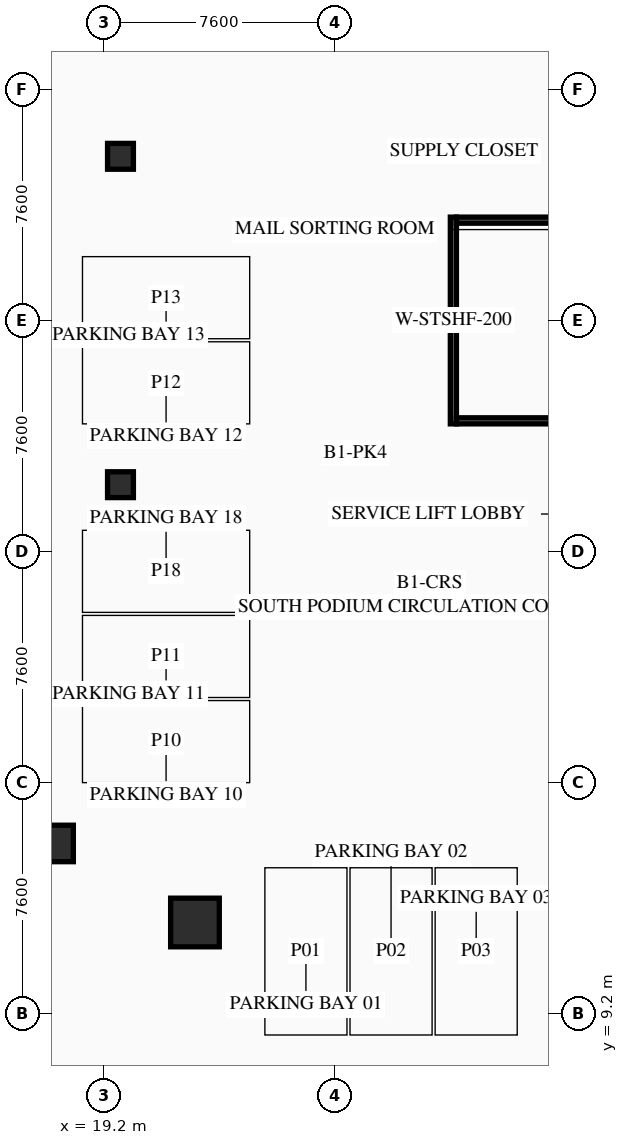
"""IFC4 building model, lengths in metres.
Left out: names, types, materials, properties, quantities, classifications, styles, units other than length and angle.
Written with IfcOpenShell. Run it as: python <this file> out.ifc"""

import sys

from ifc_helpers import new_model, si_unit, direction, frame, frame_2d, origin, origin_2d, place, context, subcontext, project, spatial, rectangle, hollow_rectangle, extrude, element, save


model = new_model("IFC4")
c1 = context("Model", 3, precision=1e-05, world=origin(), true_north=direction((0.0, 1.0)))
c2 = subcontext(c1, "Body", "Model", "MODEL_VIEW")
j1 = project(units=[si_unit("LENGTHUNIT", "METRE"), si_unit("PLANEANGLEUNIT", "RADIAN")], contexts=[c1])
p1 = place(None, origin())
s1 = spatial("IfcSite", under=j1, at=p1, CompositionType="ELEMENT")
p2 = place(p1, origin())
s2 = spatial("IfcBuilding", under=s1, at=p2, CompositionType="ELEMENT")
p3 = place(p2, frame((0.0, 0.0, -5.5)))
s3 = spatial("IfcBuildingStorey", under=s2, at=p3, CompositionType="ELEMENT", Elevation=-5.5)
p4 = place(p3, frame((22.2, 12.2, 0.0), z_axis=(0.0, 0.0, 1.0), x_axis=(1.0, 0.0, 0.0)))
e1 = element("IfcColumn", 1, at=p4, inside=s3, PredefinedType="COLUMN", context=c2, shape_type="SweptSolid", body=[
    extrude(hollow_rectangle(XDim=1.6, YDim=1.6, WallThickness=0.06, at=origin_2d()), origin(), (0.0, 0.0, 1.0), 5.2),
])
for number, where, z_axis, x_axis in (
    (2, (19.75, 37.4, 0.0), (0.0, 0.0, 1.0), (1.0, 0.0, 0.0)),
    (3, (19.75, 26.6, 0.0), (0.0, 0.0, 1.0), (1.0, 0.0, 0.0)),
):
    element("IfcColumn", number, at=place(p3, frame(where, z_axis=z_axis, x_axis=x_axis)), inside=s3, PredefinedType="COLUMN", context=c2, shape_type="SweptSolid", body=[
        extrude(hollow_rectangle(XDim=0.85, YDim=0.85, WallThickness=0.035, at=origin_2d()), origin(), (0.0, 0.0, 1.0), 5.2),
    ])
p5 = place(p3, frame((17.6, 14.8, 0.0), z_axis=(0.0, 0.0, 1.0), x_axis=(1.0, 0.0, 0.0)))
e4 = element("IfcColumn", 4, at=p5, inside=s3, PredefinedType="COLUMN", context=c2, shape_type="SweptSolid", body=[
    extrude(rectangle(XDim=1.2, YDim=1.2, at=origin_2d()), origin(), (0.0, 0.0, 1.0), 5.2),
])
p6 = place(p3, frame((30.7, 28.6, 0.0), z_axis=(0.0, 0.0, 1.0), x_axis=(0.0, 1.0, 0.0)))
e5 = element("IfcWall", 5, at=p6, inside=s3, PredefinedType="SHEAR", context=c2, shape_type="SweptSolid", body=[
    extrude(rectangle(XDim=6.8, YDim=0.2, at=frame_2d((3.4, 0.0))), origin(), (0.0, 0.0, 1.0), 5.2),
])
for number, where, z_axis, x_axis in (
    (6, (30.8, 35.3, 0.0), (0.0, 0.0, 1.0), (1.0, 0.0, 0.0)),
    (7, (30.8, 28.7, 0.0), (0.0, 0.0, 1.0), (1.0, 0.0, 0.0)),
):
    element("IfcWall", number, at=place(p3, frame(where, z_axis=z_axis, x_axis=x_axis)), inside=s3, PredefinedType="SHEAR", context=c2, shape_type="SweptSolid", body=[
        extrude(rectangle(XDim=3.4, YDim=0.2, at=frame_2d((1.7, 0.0))), origin(), (0.0, 0.0, 1.0), 5.2),
    ])
save(model, sys.argv[1])
